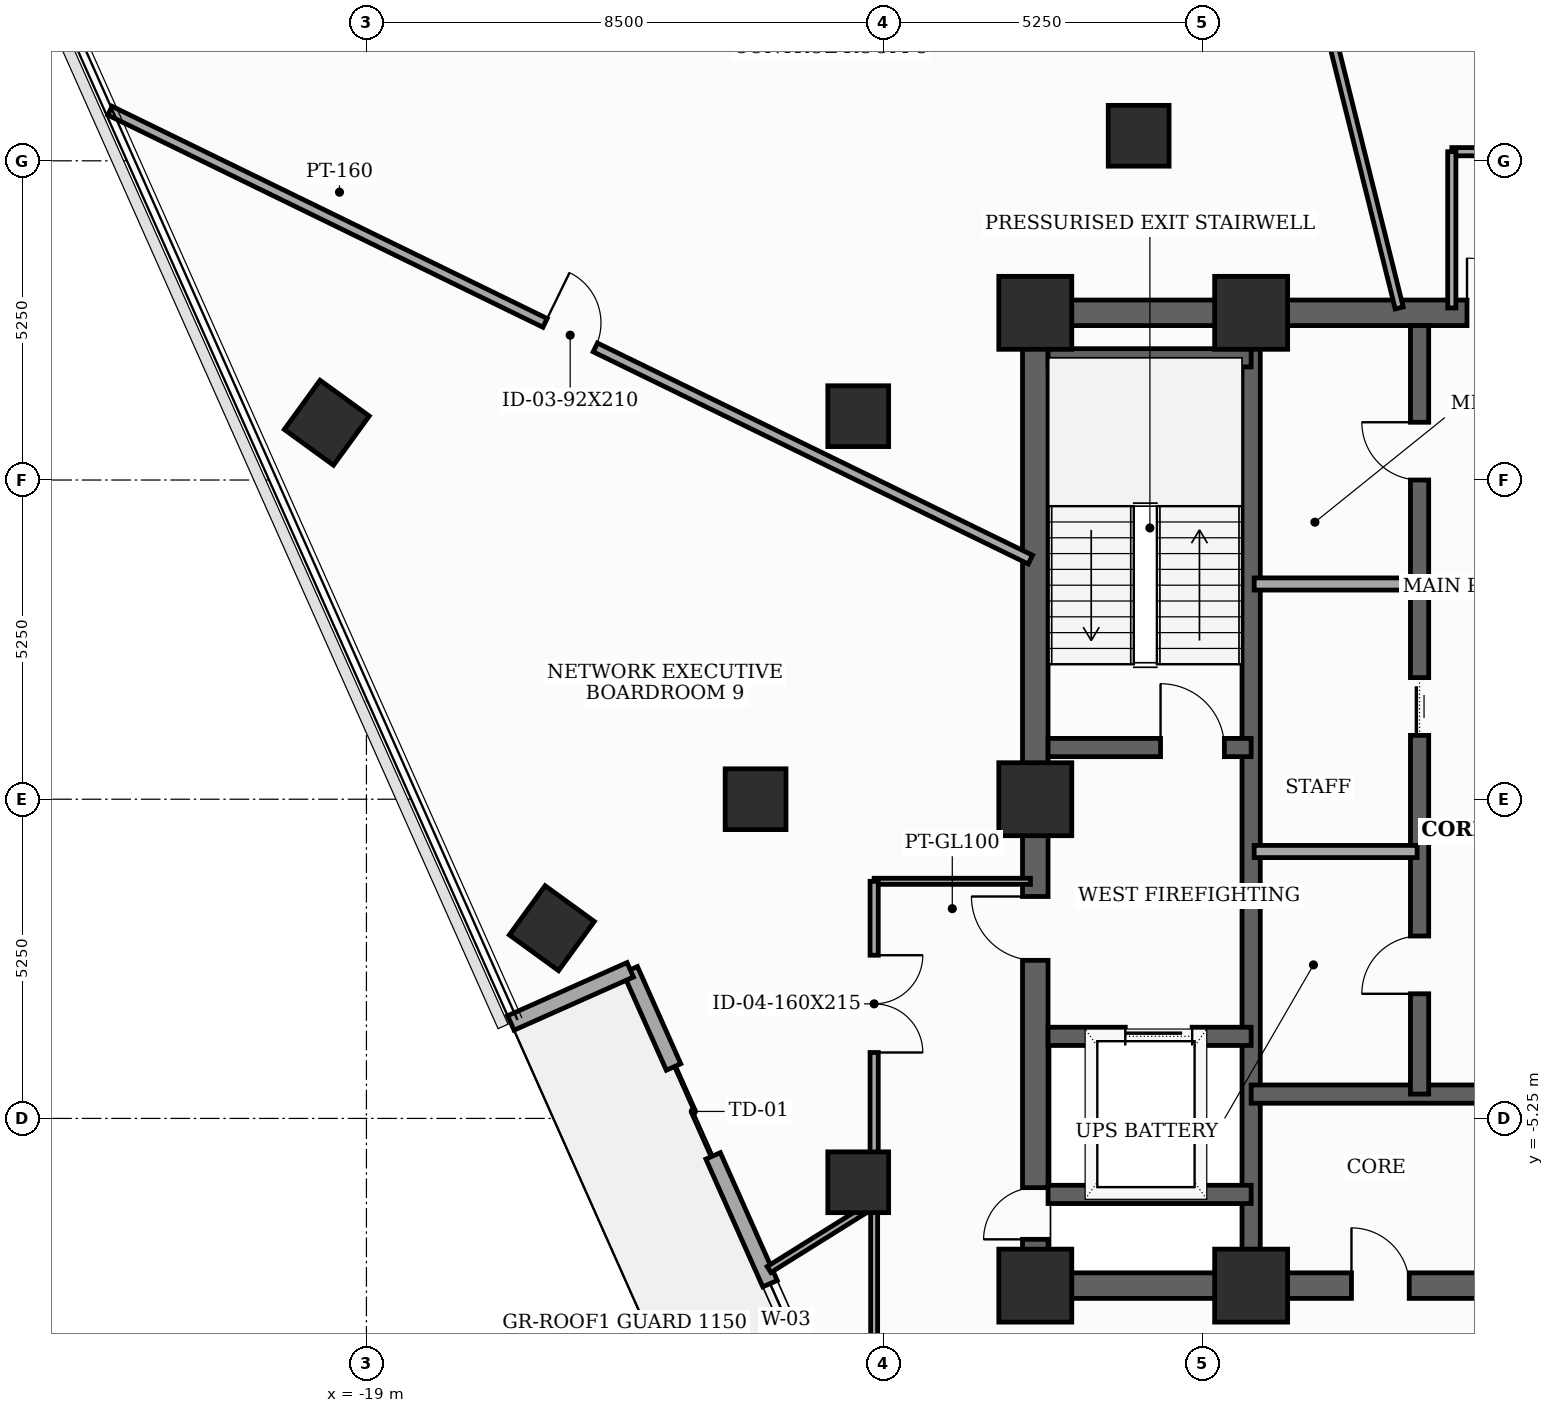
"""IFC4 building model, lengths in metres.
Left out: names, types, materials, properties, quantities, classifications, styles, units other than length and angle.
Written with IfcOpenShell. Run it as: python <this file> out.ifc"""

import sys

from ifc_helpers import new_model, si_unit, direction, frame, frame_2d, origin, origin_2d, place, context, subcontext, project, spatial, rectangle, extrude, element, fill, save


model = new_model("IFC4")
c1 = context("Model", 3, precision=1e-05, world=origin(), true_north=direction((0.0, 1.0)))
c2 = subcontext(c1, "Body", "Model", "MODEL_VIEW")
j1 = project(units=[si_unit("LENGTHUNIT", "METRE"), si_unit("PLANEANGLEUNIT", "RADIAN")], contexts=[c1])
p1 = place(None, origin())
s1 = spatial("IfcSite", under=j1, at=p1, CompositionType="ELEMENT")
p2 = place(p1, origin())
s2 = spatial("IfcBuilding", under=s1, at=p2, CompositionType="ELEMENT")
p3 = place(p2, frame((0.0, 0.0, 226.3)))
s3 = spatial("IfcBuildingStorey", under=s2, at=p3, CompositionType="ELEMENT", Elevation=226.3)
for number, where, z_axis, x_axis in (
    (1, (-8.0, -8.0, 0.0), (0.0, 0.0, 1.0), (1.0, 0.0, 0.0)),
    (2, (-4.45, -8.0, 0.0), (0.0, 0.0, 1.0), (1.0, 0.0, 0.0)),
    (3, (-4.45, 8.0, 0.0), (0.0, 0.0, 1.0), (1.0, 0.0, 0.0)),
    (4, (-8.0, 8.0, 0.0), (0.0, 0.0, 1.0), (1.0, 0.0, 0.0)),
    (5, (-8.0, 0.0, 0.0), (0.0, 0.0, 1.0), (1.0, 0.0, 0.0)),
):
    element("IfcColumn", number, at=place(p3, frame(where, z_axis=z_axis, x_axis=x_axis)), inside=s3, PredefinedType="COLUMN", context=c2, shape_type="SweptSolid", body=[
        extrude(rectangle(XDim=1.2, YDim=1.2, at=origin_2d()), origin(), (0.0, 0.0, 1.0), 3.7),
    ])
for number, where, z_axis, x_axis in (
    (6, (-6.3, 10.912, 0.0), (0.0, 0.0, 1.0), (1.0, 0.0, 0.0)),
    (7, (-10.912, 6.3, 0.0), (0.0, 0.0, 1.0), (1.0, 0.0, 0.0)),
    (8, (-12.6, 0.0, 0.0), (0.0, 0.0, 1.0), (1.0, 0.0, 0.0)),
    (9, (-10.912, -6.3, 0.0), (0.0, 0.0, 1.0), (1.0, 0.0, 0.0)),
    (10, (-19.652, 6.192, 0.0), (0.0, 0.0, 1.0), (0.588, 0.809, 0.0)),
    (11, (-15.951, -2.121, 0.0), (0.0, 0.0, 1.0), (0.588, 0.809, 0.0)),
):
    element("IfcColumn", number, at=place(p3, frame(where, z_axis=z_axis, x_axis=x_axis)), inside=s3, PredefinedType="COLUMN", context=c2, shape_type="SweptSolid", body=[
        extrude(rectangle(XDim=1.0, YDim=1.0, at=origin_2d()), origin(), (0.0, 0.0, 1.0), 3.7),
    ])
p4 = place(p3, frame((-14.661, -2.806, 0.0), z_axis=(0.0, 0.0, 1.0), x_axis=(0.406736136359, -0.913545683247, 0.0)))
e12 = element("IfcWall", 12, at=p4, inside=s3, PredefinedType="SOLIDWALL", context=c2, shape_type="SweptSolid", body=[
    extrude(rectangle(XDim=10.8, YDim=0.26, at=frame_2d((5.4, 0.0))), origin(), (0.0, 0.0, 1.0), 3.5),
])
p5 = place(p4, frame((1.75, 0.0, 0.0)))
e13 = element("IfcOpeningElement", 13, at=p5, cuts=e12, PredefinedType="OPENING", context=c2, shape_type="SweptSolid", body=[
    extrude(rectangle(XDim=1.6, YDim=2.08, at=frame_2d((0.8, 1.04))), frame((0.0, 0.14, 0.0), z_axis=(0.0, -1.0, 0.0), x_axis=(1.0, 0.0, 0.0)), (0.0, 0.0, 1.0), 0.28),
])
p6 = place(p4, frame((5.65, 0.0, 0.85)))
e14 = element("IfcOpeningElement", 14, at=p6, cuts=e12, PredefinedType="OPENING", context=c2, shape_type="SweptSolid", body=[
    extrude(rectangle(XDim=1.3, YDim=1.25, at=frame_2d((0.65, 0.625))), frame((0.0, 0.14, 0.0), z_axis=(0.0, -1.0, 0.0), x_axis=(1.0, 0.0, 0.0)), (0.0, 0.0, 1.0), 0.28),
])
p7 = place(p3, frame((-16.625, -3.68, 0.0), z_axis=(0.0, 0.0, 1.0), x_axis=(0.913539751874, 0.406749458199, 0.0)))
e15 = element("IfcWall", 15, at=p7, inside=s3, PredefinedType="SOLIDWALL", context=c2, shape_type="SweptSolid", body=[
    extrude(rectangle(XDim=2.15, YDim=0.26, at=frame_2d((1.075, 0.0))), origin(), (0.0, 0.0, 1.0), 3.5),
])
p8 = place(p3, frame((-8.0, -8.0, 0.0), z_axis=(0.0, 0.0, 1.0), x_axis=(0.0, 1.0, 0.0)))
e16 = element("IfcWall", 16, at=p8, inside=s3, PredefinedType="SHEAR", context=c2, shape_type="SweptSolid", body=[
    extrude(rectangle(XDim=16.0, YDim=0.42, at=frame_2d((8.0, 0.0))), origin(), (0.0, 0.0, 1.0), 3.5),
])
p9 = place(p8, frame((0.761, 0.0, 0.0)))
e17 = element("IfcOpeningElement", 17, at=p9, cuts=e16, PredefinedType="OPENING", context=c2, shape_type="SweptSolid", body=[
    extrude(rectangle(XDim=0.85, YDim=2.02, at=frame_2d((0.425, 1.01))), frame((0.0, 0.22, 0.0), z_axis=(0.0, -1.0, 0.0), x_axis=(1.0, 0.0, 0.0)), (0.0, 0.0, 1.0), 0.44),
])
p10 = place(p8, frame((5.35, 0.0, 0.0)))
e18 = element("IfcOpeningElement", 18, at=p10, cuts=e16, PredefinedType="OPENING", context=c2, shape_type="SweptSolid", body=[
    extrude(rectangle(XDim=1.05, YDim=2.15, at=frame_2d((0.525, 1.075))), frame((0.0, 0.22, 0.0), z_axis=(0.0, -1.0, 0.0), x_axis=(1.0, 0.0, 0.0)), (0.0, 0.0, 1.0), 0.44),
])
p11 = place(p3, frame((-8.0, -8.0, 0.0), z_axis=(0.0, 0.0, 1.0), x_axis=(1.0, 0.0, 0.0)))
e19 = element("IfcWall", 19, at=p11, inside=s3, PredefinedType="SHEAR", context=c2, shape_type="SweptSolid", body=[
    extrude(rectangle(XDim=16.0, YDim=0.42, at=frame_2d((8.0, 0.0))), origin(), (0.0, 0.0, 1.0), 3.5),
])
p12 = place(p11, frame((5.2, 0.0, 0.0)))
e20 = element("IfcOpeningElement", 20, at=p12, cuts=e19, PredefinedType="OPENING", context=c2, shape_type="SweptSolid", body=[
    extrude(rectangle(XDim=0.95, YDim=2.1, at=frame_2d((0.475, 1.05))), frame((0.0, 0.22, 0.0), z_axis=(0.0, -1.0, 0.0), x_axis=(1.0, 0.0, 0.0)), (0.0, 0.0, 1.0), 0.44),
])
p13 = place(p11, frame((9.8, 0.0, 0.0)))
e21 = element("IfcOpeningElement", 21, at=p13, cuts=e19, PredefinedType="OPENING", context=c2, shape_type="SweptSolid", body=[
    extrude(rectangle(XDim=0.95, YDim=2.1, at=frame_2d((0.475, 1.05))), frame((0.0, 0.22, 0.0), z_axis=(0.0, -1.0, 0.0), x_axis=(1.0, 0.0, 0.0)), (0.0, 0.0, 1.0), 0.44),
])
p14 = place(p3, frame((-8.0, 8.0, 0.0), z_axis=(0.0, 0.0, 1.0), x_axis=(1.0, 0.0, 0.0)))
e22 = element("IfcWall", 22, at=p14, inside=s3, PredefinedType="SHEAR", context=c2, shape_type="SweptSolid", body=[
    extrude(rectangle(XDim=16.0, YDim=0.42, at=frame_2d((8.0, 0.0))), origin(), (0.0, 0.0, 1.0), 3.5),
])
p15 = place(p14, frame((7.1, 0.0, 0.0)))
e23 = element("IfcOpeningElement", 23, at=p15, cuts=e22, PredefinedType="OPENING", context=c2, shape_type="SweptSolid", body=[
    extrude(rectangle(XDim=1.8, YDim=2.15, at=frame_2d((0.9, 1.075))), frame((0.0, 0.22, 0.0), z_axis=(0.0, -1.0, 0.0), x_axis=(1.0, 0.0, 0.0)), (0.0, 0.0, 1.0), 0.44),
])
p16 = place(p3, frame((-4.45, -7.79, 0.0), z_axis=(0.0, 0.0, 1.0), x_axis=(0.0, 1.0, 0.0)))
e24 = element("IfcWall", 24, at=p16, inside=s3, PredefinedType="SHEAR", context=c2, shape_type="SweptSolid", body=[
    extrude(rectangle(XDim=15.58, YDim=0.3, at=frame_2d((7.79, 0.0))), origin(), (0.0, 0.0, 1.0), 3.5),
])
p17 = place(p3, frame((-7.79, 0.85, 0.0), z_axis=(0.0, 0.0, 1.0), x_axis=(1.0, 0.0, 0.0)))
e25 = element("IfcWall", 25, at=p17, inside=s3, PredefinedType="SHEAR", context=c2, shape_type="SweptSolid", body=[
    extrude(rectangle(XDim=3.34, YDim=0.3, at=frame_2d((1.67, 0.0))), origin(), (0.0, 0.0, 1.0), 3.5),
])
p18 = place(p17, frame((1.85, 0.0, 0.0)))
e26 = element("IfcOpeningElement", 26, at=p18, cuts=e25, PredefinedType="OPENING", context=c2, shape_type="SweptSolid", body=[
    extrude(rectangle(XDim=1.05, YDim=2.15, at=frame_2d((0.525, 1.075))), frame((0.0, 0.16, 0.0), z_axis=(0.0, -1.0, 0.0), x_axis=(1.0, 0.0, 0.0)), (0.0, 0.0, 1.0), 0.32),
])
p19 = place(p3, frame((-7.79, 7.26, 0.0), z_axis=(0.0, 0.0, 1.0), x_axis=(1.0, 0.0, 0.0)))
e27 = element("IfcWall", 27, at=p19, inside=s3, PredefinedType="SHEAR", context=c2, shape_type="SweptSolid", body=[
    extrude(rectangle(XDim=3.34, YDim=0.3, at=frame_2d((1.67, 0.0))), origin(), (0.0, 0.0, 1.0), 3.5),
])
p20 = place(p3, frame((-7.79, -3.9, 0.0), z_axis=(0.0, 0.0, 1.0), x_axis=(1.0, 0.0, 0.0)))
e28 = element("IfcWall", 28, at=p20, inside=s3, PredefinedType="SHEAR", context=c2, shape_type="SweptSolid", body=[
    extrude(rectangle(XDim=3.34, YDim=0.3, at=frame_2d((1.67, 0.0))), origin(), (0.0, 0.0, 1.0), 3.5),
])
p21 = place(p20, frame((1.27, 0.0, 0.0)))
e29 = element("IfcOpeningElement", 29, at=p21, cuts=e28, PredefinedType="OPENING", context=c2, shape_type="SweptSolid", body=[
    extrude(rectangle(XDim=1.1, YDim=2.1, at=frame_2d((0.55, 1.05))), frame((0.0, 0.16, 0.0), z_axis=(0.0, -1.0, 0.0), x_axis=(1.0, 0.0, 0.0)), (0.0, 0.0, 1.0), 0.32),
])
p22 = place(p3, frame((-7.79, -6.5, 0.0), z_axis=(0.0, 0.0, 1.0), x_axis=(1.0, 0.0, 0.0)))
e30 = element("IfcWall", 30, at=p22, inside=s3, PredefinedType="SHEAR", context=c2, shape_type="SweptSolid", body=[
    extrude(rectangle(XDim=3.34, YDim=0.3, at=frame_2d((1.67, 0.0))), origin(), (0.0, 0.0, 1.0), 3.5),
])
p23 = place(p3, frame((-4.45, -4.85, 0.0), z_axis=(0.0, 0.0, 1.0), x_axis=(1.0, 0.0, 0.0)))
e31 = element("IfcWall", 31, at=p23, inside=s3, PredefinedType="SHEAR", context=c2, shape_type="SweptSolid", body=[
    extrude(rectangle(XDim=8.9, YDim=0.3, at=frame_2d((4.45, 0.0))), origin(), (0.0, 0.0, 1.0), 3.5),
])
p24 = place(p3, frame((-1.68, -4.85, 0.0), z_axis=(0.0, 0.0, 1.0), x_axis=(0.0, 1.0, 0.0)))
e32 = element("IfcWall", 32, at=p24, inside=s3, PredefinedType="SHEAR", context=c2, shape_type="SweptSolid", body=[
    extrude(rectangle(XDim=12.64, YDim=0.3, at=frame_2d((6.32, 0.0))), origin(), (0.0, 0.0, 1.0), 3.5),
])
p25 = place(p24, frame((1.65, 0.0, 0.0)))
e33 = element("IfcOpeningElement", 33, at=p25, cuts=e32, PredefinedType="OPENING", context=c2, shape_type="SweptSolid", body=[
    extrude(rectangle(XDim=0.95, YDim=2.1, at=frame_2d((0.475, 1.05))), frame((0.0, 0.16, 0.0), z_axis=(0.0, -1.0, 0.0), x_axis=(1.0, 0.0, 0.0)), (0.0, 0.0, 1.0), 0.32),
])
p26 = place(p24, frame((5.9, 0.0, 0.0)))
e34 = element("IfcOpeningElement", 34, at=p26, cuts=e32, PredefinedType="OPENING", context=c2, shape_type="SweptSolid", body=[
    extrude(rectangle(XDim=0.95, YDim=2.1, at=frame_2d((0.475, 1.05))), frame((0.0, 0.16, 0.0), z_axis=(0.0, -1.0, 0.0), x_axis=(1.0, 0.0, 0.0)), (0.0, 0.0, 1.0), 0.32),
])
p27 = place(p24, frame((10.1, 0.0, 0.0)))
e35 = element("IfcOpeningElement", 35, at=p27, cuts=e32, PredefinedType="OPENING", context=c2, shape_type="SweptSolid", body=[
    extrude(rectangle(XDim=0.95, YDim=2.1, at=frame_2d((0.475, 1.05))), frame((0.0, 0.16, 0.0), z_axis=(0.0, -1.0, 0.0), x_axis=(1.0, 0.0, 0.0)), (0.0, 0.0, 1.0), 0.32),
])
for number, where, z_axis, x_axis in (
    (36, (-4.4, -0.86, 0.0), (0.0, 0.0, 1.0), (1.0, 0.0, 0.0)),
    (37, (-4.4, 3.54, 0.0), (0.0, 0.0, 1.0), (1.0, 0.0, 0.0)),
):
    element("IfcWall", number, at=place(p3, frame(where, z_axis=z_axis, x_axis=x_axis)), inside=s3, PredefinedType="SOLIDWALL", context=c2, shape_type="SweptSolid", body=[
        extrude(rectangle(XDim=2.68, YDim=0.2, at=frame_2d((1.34, 0.0))), origin(), (0.0, 0.0, 1.0), 3.5),
    ])
p28 = place(p3, frame((-10.65, -6.655, 0.0), z_axis=(0.0, 0.0, 1.0), x_axis=(0.0, -1.0, 0.0)))
e38 = element("IfcWall", 38, at=p28, inside=s3, PredefinedType="PARTITIONING", context=c2, shape_type="SweptSolid", body=[
    extrude(rectangle(XDim=3.495, YDim=0.115, at=frame_2d((1.748, 0.0))), origin(), (0.0, 0.0, 1.0), 2.885),
])
p29 = place(p3, frame((10.15, 10.65, 0.0), z_axis=(0.0, 0.0, 1.0), x_axis=(-1.0, 0.0, 0.0)))
e39 = element("IfcWall", 39, at=p29, inside=s3, PredefinedType="PARTITIONING", context=c2, shape_type="SweptSolid", body=[
    extrude(rectangle(XDim=11.3, YDim=0.135, at=frame_2d((5.65, 0.0))), origin(), (0.0, 0.0, 1.0), 2.885),
])
p30 = place(p29, frame((6.531, 0.0, 0.0)))
e40 = element("IfcOpeningElement", 40, at=p30, cuts=e39, PredefinedType="OPENING", context=c2, shape_type="SweptSolid", body=[
    extrude(rectangle(XDim=0.95, YDim=2.1, at=frame_2d((0.475, 1.05))), frame((0.0, 0.077, 0.0), z_axis=(0.0, -1.0, 0.0), x_axis=(1.0, 0.0, 0.0)), (0.0, 0.0, 1.0), 0.155),
])
p31 = place(p3, frame((-1.15, 10.65, 0.0), z_axis=(0.0, 0.0, 1.0), x_axis=(0.0, -1.0, 0.0)))
e41 = element("IfcWall", 41, at=p31, inside=s3, PredefinedType="PARTITIONING", context=c2, shape_type="SweptSolid", body=[
    extrude(rectangle(XDim=2.57, YDim=0.135, at=frame_2d((1.285, 0.0))), origin(), (0.0, 0.0, 1.0), 2.885),
])
p32 = place(p3, frame((-8.08, -1.35, 0.0), z_axis=(0.0, 0.0, 1.0), x_axis=(-1.0, 0.0, 0.0)))
e42 = element("IfcWall", 42, at=p32, inside=s3, PredefinedType="MOVABLE", context=c2, shape_type="SweptSolid", body=[
    extrude(rectangle(XDim=2.57, YDim=0.1, at=frame_2d((1.285, 0.0))), origin(), (0.0, 0.0, 1.0), 2.885),
])
p33 = place(p3, frame((-10.65, -1.35, 0.0), z_axis=(0.0, 0.0, 1.0), x_axis=(0.0, -1.0, 0.0)))
e43 = element("IfcWall", 43, at=p33, inside=s3, PredefinedType="PARTITIONING", context=c2, shape_type="SweptSolid", body=[
    extrude(rectangle(XDim=5.305, YDim=0.135, at=frame_2d((2.652, 0.0))), origin(), (0.0, 0.0, 1.0), 2.885),
])
p34 = place(p33, frame((1.216, 0.0, 0.0)))
e44 = element("IfcOpeningElement", 44, at=p34, cuts=e43, PredefinedType="OPENING", context=c2, shape_type="SweptSolid", body=[
    extrude(rectangle(XDim=1.6, YDim=2.15, at=frame_2d((0.8, 1.075))), frame((0.0, 0.077, 0.0), z_axis=(0.0, -1.0, 0.0), x_axis=(1.0, 0.0, 0.0)), (0.0, 0.0, 1.0), 0.155),
])
p35 = place(p3, frame((-10.65, -6.655, 0.0), z_axis=(0.0, 0.0, 1.0), x_axis=(-0.848119384497, -0.529805161962, 0.0)))
e45 = element("IfcWall", 45, at=p35, inside=s3, PredefinedType="PARTITIONING", context=c2, shape_type="SweptSolid", body=[
    extrude(rectangle(XDim=2.039, YDim=0.115, at=frame_2d((1.019, 0.0))), origin(), (0.0, 0.0, 1.0), 2.885),
])
p36 = place(p3, frame((-3.803, 15.255, 0.0), z_axis=(0.0, 0.0, 1.0), x_axis=(0.241851911951, -0.970313172479, 0.0)))
e46 = element("IfcWall", 46, at=p36, inside=s3, PredefinedType="PARTITIONING", context=c2, shape_type="SweptSolid", body=[
    extrude(rectangle(XDim=7.394, YDim=0.135, at=frame_2d((3.697, 0.0))), origin(), (0.0, 0.0, 1.0), 2.885),
])
p37 = place(p3, frame((-23.218, 11.324, 0.0), z_axis=(0.0, 0.0, 1.0), x_axis=(0.898787530524, -0.438384505856, 0.0)))
e47 = element("IfcWall", 47, at=p37, inside=s3, PredefinedType="PARTITIONING", context=c2, shape_type="SweptSolid", body=[
    extrude(rectangle(XDim=16.843, YDim=0.16, at=frame_2d((8.421, 0.0))), origin(), (0.0, 0.0, 1.0), 2.885),
])
p38 = place(p37, frame((7.961, 0.0, 0.0)))
e48 = element("IfcOpeningElement", 48, at=p38, cuts=e47, PredefinedType="OPENING", context=c2, shape_type="SweptSolid", body=[
    extrude(rectangle(XDim=0.92, YDim=2.1, at=frame_2d((0.46, 1.05))), frame((0.0, 0.09, 0.0), z_axis=(0.0, -1.0, 0.0), x_axis=(1.0, 0.0, 0.0)), (0.0, 0.0, 1.0), 0.18),
])
p39 = place(p5, frame((1.6, 0.0, 0.0), z_axis=(0.0, 0.0, 1.0), x_axis=(-1.0, 0.0, 0.0)))
e49 = element("IfcDoor", 49, at=p39, inside=s3, OperationType="DOUBLE_DOOR_SLIDING", PredefinedType="DOOR", context=c2, shape_type="SweptSolid", body=[
    extrude(rectangle(XDim=1.6, YDim=2.08, at=frame_2d((0.8, 1.04))), frame((0.0, 0.025, 0.0), z_axis=(0.0, -1.0, 0.0), x_axis=(1.0, 0.0, 0.0)), (0.0, 0.0, 1.0), 0.05),
])
fill(e13, e49)
p40 = place(p6, origin())
e50 = element("IfcWindow", 50, at=p40, inside=s3, PartitioningType="SINGLE_PANEL", PredefinedType="WINDOW", context=c2, shape_type="SweptSolid", body=[
    extrude(rectangle(XDim=1.3, YDim=1.25, at=frame_2d((0.65, 0.625))), frame((0.0, 0.03, 0.0), z_axis=(0.0, -1.0, 0.0), x_axis=(1.0, 0.0, 0.0)), (0.0, 0.0, 1.0), 0.06),
])
fill(e14, e50)
p41 = place(p9, origin())
e51 = element("IfcDoor", 51, at=p41, inside=s3, OperationType="SINGLE_SWING_LEFT", PredefinedType="TRAPDOOR", context=c2, shape_type="SweptSolid", body=[
    extrude(rectangle(XDim=0.85, YDim=2.02, at=frame_2d((0.425, 1.01))), frame((0.0, 0.025, 0.0), z_axis=(0.0, -1.0, 0.0), x_axis=(1.0, 0.0, 0.0)), (0.0, 0.0, 1.0), 0.05),
])
fill(e17, e51)
p42 = place(p10, origin())
e52 = element("IfcDoor", 52, at=p42, inside=s3, OperationType="SINGLE_SWING_RIGHT", PredefinedType="DOOR", context=c2, shape_type="SweptSolid", body=[
    extrude(rectangle(XDim=1.05, YDim=2.15, at=frame_2d((0.525, 1.075))), frame((0.0, 0.025, 0.0), z_axis=(0.0, -1.0, 0.0), x_axis=(1.0, 0.0, 0.0)), (0.0, 0.0, 1.0), 0.05),
])
fill(e18, e52)
p43 = place(p12, origin())
e53 = element("IfcDoor", 53, at=p43, inside=s3, OperationType="SINGLE_SWING_LEFT", PredefinedType="DOOR", context=c2, shape_type="SweptSolid", body=[
    extrude(rectangle(XDim=0.95, YDim=2.1, at=frame_2d((0.475, 1.05))), frame((0.0, 0.025, 0.0), z_axis=(0.0, -1.0, 0.0), x_axis=(1.0, 0.0, 0.0)), (0.0, 0.0, 1.0), 0.05),
])
fill(e20, e53)
p44 = place(p15, origin())
e54 = element("IfcDoor", 54, at=p44, inside=s3, OperationType="DOUBLE_DOOR_SINGLE_SWING", PredefinedType="DOOR", context=c2, shape_type="SweptSolid", body=[
    extrude(rectangle(XDim=1.8, YDim=2.15, at=frame_2d((0.9, 1.075))), frame((0.0, 0.025, 0.0), z_axis=(0.0, -1.0, 0.0), x_axis=(1.0, 0.0, 0.0)), (0.0, 0.0, 1.0), 0.05),
])
fill(e23, e54)
p45 = place(p18, origin())
e55 = element("IfcDoor", 55, at=p45, inside=s3, OperationType="SINGLE_SWING_LEFT", PredefinedType="DOOR", context=c2, shape_type="SweptSolid", body=[
    extrude(rectangle(XDim=1.05, YDim=2.15, at=frame_2d((0.525, 1.075))), frame((0.0, 0.025, 0.0), z_axis=(0.0, -1.0, 0.0), x_axis=(1.0, 0.0, 0.0)), (0.0, 0.0, 1.0), 0.05),
])
fill(e26, e55)
p46 = place(p21, origin())
e56 = element("IfcDoor", 56, at=p46, inside=s3, OperationType="SLIDING_TO_LEFT", PredefinedType="DOOR", context=c2, shape_type="SweptSolid", body=[
    extrude(rectangle(XDim=1.1, YDim=2.1, at=frame_2d((0.55, 1.05))), frame((0.0, 0.025, 0.0), z_axis=(0.0, -1.0, 0.0), x_axis=(1.0, 0.0, 0.0)), (0.0, 0.0, 1.0), 0.05),
])
fill(e29, e56)
p47 = place(p25, origin())
e57 = element("IfcDoor", 57, at=p47, inside=s3, OperationType="SINGLE_SWING_LEFT", PredefinedType="DOOR", context=c2, shape_type="SweptSolid", body=[
    extrude(rectangle(XDim=0.95, YDim=2.1, at=frame_2d((0.475, 1.05))), frame((0.0, 0.025, 0.0), z_axis=(0.0, -1.0, 0.0), x_axis=(1.0, 0.0, 0.0)), (0.0, 0.0, 1.0), 0.05),
])
fill(e33, e57)
p48 = place(p26, origin())
e58 = element("IfcDoor", 58, at=p48, inside=s3, OperationType="SLIDING_TO_LEFT", PredefinedType="DOOR", context=c2, shape_type="SweptSolid", body=[
    extrude(rectangle(XDim=0.95, YDim=2.1, at=frame_2d((0.475, 1.05))), frame((0.0, 0.025, 0.0), z_axis=(0.0, -1.0, 0.0), x_axis=(1.0, 0.0, 0.0)), (0.0, 0.0, 1.0), 0.05),
])
fill(e34, e58)
p49 = place(p27, origin())
e59 = element("IfcDoor", 59, at=p49, inside=s3, OperationType="SINGLE_SWING_RIGHT", PredefinedType="DOOR", context=c2, shape_type="SweptSolid", body=[
    extrude(rectangle(XDim=0.95, YDim=2.1, at=frame_2d((0.475, 1.05))), frame((0.0, 0.025, 0.0), z_axis=(0.0, -1.0, 0.0), x_axis=(1.0, 0.0, 0.0)), (0.0, 0.0, 1.0), 0.05),
])
fill(e35, e59)
p50 = place(p34, origin())
e60 = element("IfcDoor", 60, at=p50, inside=s3, OperationType="DOUBLE_DOOR_SINGLE_SWING", PredefinedType="DOOR", context=c2, shape_type="SweptSolid", body=[
    extrude(rectangle(XDim=1.6, YDim=2.15, at=frame_2d((0.8, 1.075))), frame((0.0, 0.025, 0.0), z_axis=(0.0, -1.0, 0.0), x_axis=(1.0, 0.0, 0.0)), (0.0, 0.0, 1.0), 0.05),
])
fill(e44, e60)
p51 = place(p38, origin())
e61 = element("IfcDoor", 61, at=p51, inside=s3, OperationType="SINGLE_SWING_LEFT", PredefinedType="DOOR", context=c2, shape_type="SweptSolid", body=[
    extrude(rectangle(XDim=0.92, YDim=2.1, at=frame_2d((0.46, 1.05))), frame((0.0, 0.025, 0.0), z_axis=(0.0, -1.0, 0.0), x_axis=(1.0, 0.0, 0.0)), (0.0, 0.0, 1.0), 0.05),
])
fill(e48, e61)
save(model, sys.argv[1])
